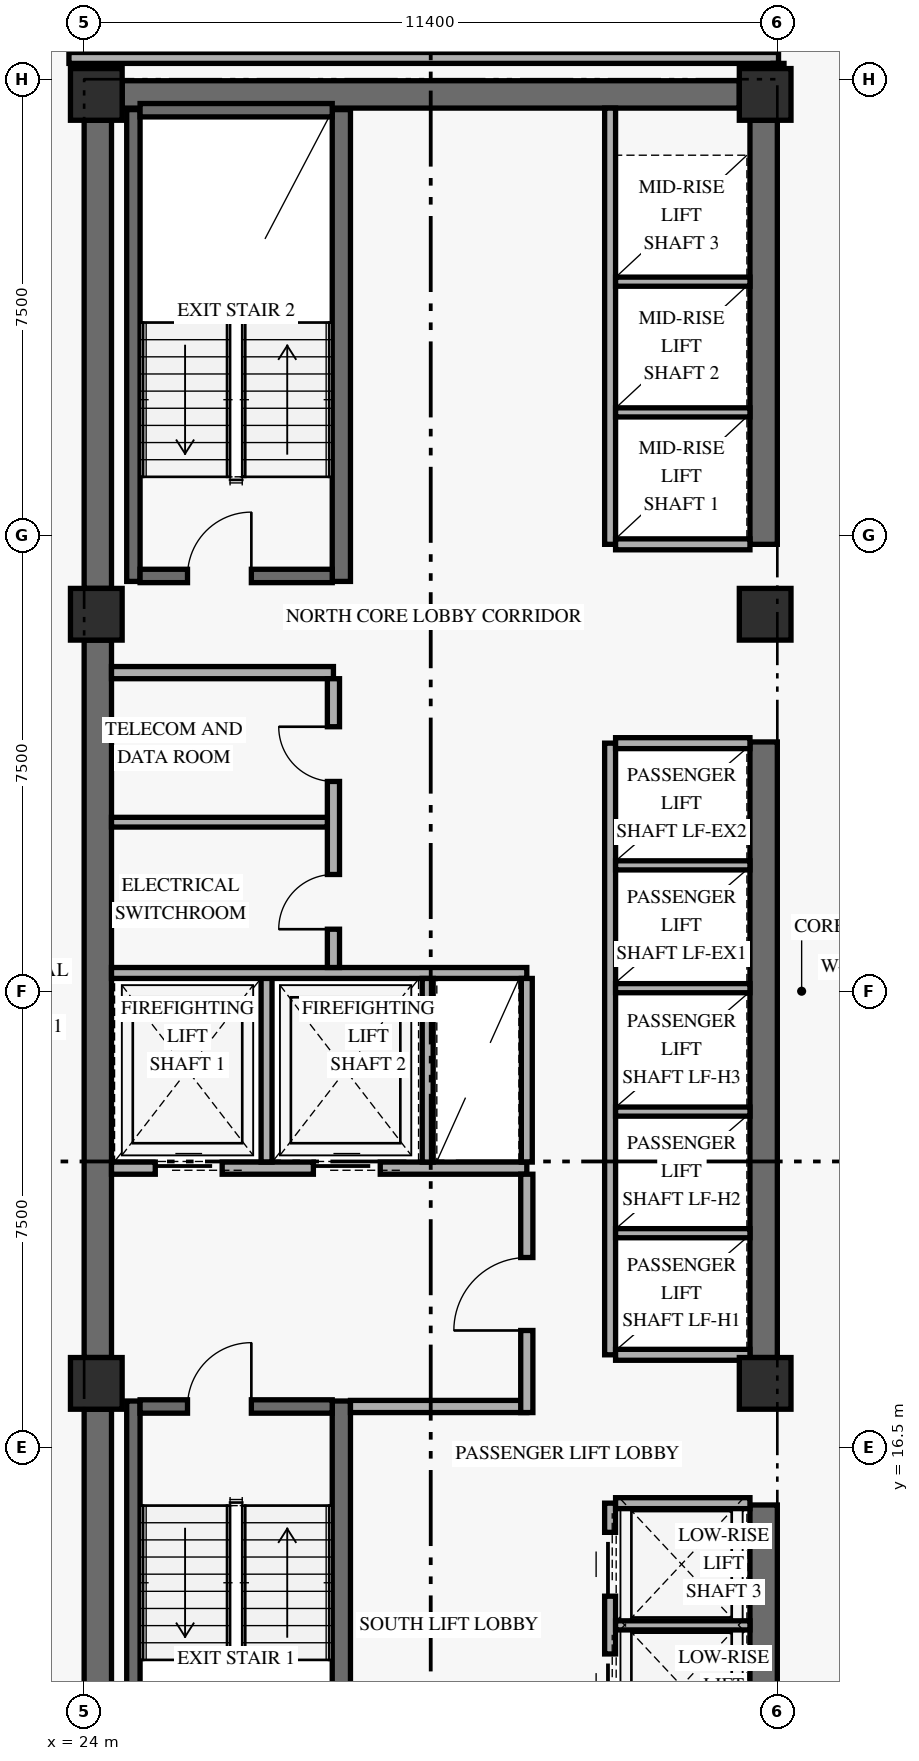
"""IFC4 building model, lengths in metres.
Left out: names, types, materials, properties, quantities, classifications, styles, units other than length and angle.
Written with IfcOpenShell. Run it as: python <this file> out.ifc"""

import sys

from ifc_helpers import new_model, si_unit, direction, frame, frame_2d, origin, origin_2d, place, context, subcontext, project, spatial, rectangle, extrude, element, fill, save


model = new_model("IFC4")
c1 = context("Model", 3, precision=1e-05, world=origin(), true_north=direction((0.0, 1.0)))
c2 = subcontext(c1, "Body", "Model", "MODEL_VIEW")
j1 = project(units=[si_unit("LENGTHUNIT", "METRE"), si_unit("PLANEANGLEUNIT", "RADIAN")], contexts=[c1])
p1 = place(None, origin())
s1 = spatial("IfcSite", under=j1, at=p1, CompositionType="ELEMENT")
p2 = place(p1, origin())
s2 = spatial("IfcBuilding", under=s1, at=p2, CompositionType="ELEMENT")
p3 = place(p2, frame((0.0, 0.0, 49.2)))
s3 = spatial("IfcBuildingStorey", under=s2, at=p3, CompositionType="ELEMENT", Elevation=49.2)
p4 = place(p3, frame((24.225, 9.675, 0.0), z_axis=(0.0, 0.0, 1.0), x_axis=(0.0, 1.0, 0.0)))
e1 = element("IfcWall", 1, at=p4, inside=s3, PredefinedType="SHEAR", context=c2, shape_type="SweptSolid", body=[
    extrude(rectangle(XDim=7.45, YDim=0.45, at=frame_2d((3.725, 0.0))), origin(), (0.0, 0.0, 1.0), 2.667),
])
p5 = place(p3, frame((24.225, 17.975, 0.0), z_axis=(0.0, 0.0, 1.0), x_axis=(0.0, 1.0, 0.0)))
e2 = element("IfcWall", 2, at=p5, inside=s3, PredefinedType="SHEAR", context=c2, shape_type="SweptSolid", body=[
    extrude(rectangle(XDim=11.8, YDim=0.45, at=frame_2d((5.9, 0.0))), origin(), (0.0, 0.0, 1.0), 2.667),
])
p6 = place(p3, frame((24.225, 30.625, 0.0), z_axis=(0.0, 0.0, 1.0), x_axis=(0.0, 1.0, 0.0)))
e3 = element("IfcWall", 3, at=p6, inside=s3, PredefinedType="SHEAR", context=c2, shape_type="SweptSolid", body=[
    extrude(rectangle(XDim=7.7, YDim=0.45, at=frame_2d((3.85, 0.0))), origin(), (0.0, 0.0, 1.0), 2.667),
])
p7 = place(p3, frame((35.175, 9.675, 0.0), z_axis=(0.0, 0.0, 1.0), x_axis=(0.0, 1.0, 0.0)))
e4 = element("IfcWall", 4, at=p7, inside=s3, PredefinedType="SHEAR", context=c2, shape_type="SweptSolid", body=[
    extrude(rectangle(XDim=5.875, YDim=0.45, at=frame_2d((2.938, 0.0))), origin(), (0.0, 0.0, 1.0), 2.667),
])
p8 = place(p3, frame((35.175, 17.975, 0.0), z_axis=(0.0, 0.0, 1.0), x_axis=(0.0, 1.0, 0.0)))
e5 = element("IfcWall", 5, at=p8, inside=s3, PredefinedType="SHEAR", context=c2, shape_type="SweptSolid", body=[
    extrude(rectangle(XDim=10.125, YDim=0.45, at=frame_2d((5.062, 0.0))), origin(), (0.0, 0.0, 1.0), 2.667),
])
p9 = place(p3, frame((35.175, 31.35, 0.0), z_axis=(0.0, 0.0, 1.0), x_axis=(0.0, 1.0, 0.0)))
e6 = element("IfcWall", 6, at=p9, inside=s3, PredefinedType="SHEAR", context=c2, shape_type="SweptSolid", body=[
    extrude(rectangle(XDim=6.975, YDim=0.45, at=frame_2d((3.487, 0.0))), origin(), (0.0, 0.0, 1.0), 2.667),
])
p10 = place(p3, frame((24.625, 38.75, 0.0), z_axis=(0.0, 0.0, 1.0), x_axis=(1.0, 0.0, 0.0)))
e7 = element("IfcWall", 7, at=p10, inside=s3, PredefinedType="SHEAR", context=c2, shape_type="SweptSolid", body=[
    extrude(rectangle(XDim=10.15, YDim=0.45, at=frame_2d((5.075, 0.0))), origin(), (0.0, 0.0, 1.0), 3.36),
])
p11 = place(p3, frame((24.81, 9.5, 0.0), z_axis=(0.0, 0.0, 1.0), x_axis=(0.0, 1.0, 0.0)))
e8 = element("IfcWall", 8, at=p11, inside=s3, PredefinedType="SHEAR", context=c2, shape_type="SweptSolid", body=[
    extrude(rectangle(XDim=7.76, YDim=0.22, at=frame_2d((3.88, 0.0))), origin(), (0.0, 0.0, 1.0), 3.36),
])
p12 = place(p3, frame((28.23, 9.5, 0.0), z_axis=(0.0, 0.0, 1.0), x_axis=(0.0, 1.0, 0.0)))
e9 = element("IfcWall", 9, at=p12, inside=s3, PredefinedType="SHEAR", context=c2, shape_type="SweptSolid", body=[
    extrude(rectangle(XDim=7.76, YDim=0.3, at=frame_2d((3.88, 0.0))), origin(), (0.0, 0.0, 1.0), 3.36),
])
p13 = place(p3, frame((24.92, 17.17, 0.0), z_axis=(0.0, 0.0, 1.0), x_axis=(1.0, 0.0, 0.0)))
e10 = element("IfcWall", 10, at=p13, inside=s3, PredefinedType="SHEAR", context=c2, shape_type="SweptSolid", body=[
    extrude(rectangle(XDim=3.16, YDim=0.22, at=frame_2d((1.58, 0.0))), origin(), (0.0, 0.0, 1.0), 3.36),
])
p14 = place(p13, frame((0.78, 0.0, 0.0)))
e11 = element("IfcOpeningElement", 11, at=p14, cuts=e10, PredefinedType="OPENING", context=c2, shape_type="SweptSolid", body=[
    extrude(rectangle(XDim=1.05, YDim=2.15, at=frame_2d((0.525, 1.075))), frame((0.0, 0.12, 0.0), z_axis=(0.0, -1.0, 0.0), x_axis=(1.0, 0.0, 0.0)), (0.0, 0.0, 1.0), 0.24),
])
p15 = place(p3, frame((24.81, 30.74, 0.0), z_axis=(0.0, 0.0, 1.0), x_axis=(0.0, 1.0, 0.0)))
e12 = element("IfcWall", 12, at=p15, inside=s3, PredefinedType="SHEAR", context=c2, shape_type="SweptSolid", body=[
    extrude(rectangle(XDim=7.76, YDim=0.22, at=frame_2d((3.88, 0.0))), origin(), (0.0, 0.0, 1.0), 3.36),
])
p16 = place(p3, frame((28.23, 30.74, 0.0), z_axis=(0.0, 0.0, 1.0), x_axis=(0.0, 1.0, 0.0)))
e13 = element("IfcWall", 13, at=p16, inside=s3, PredefinedType="SHEAR", context=c2, shape_type="SweptSolid", body=[
    extrude(rectangle(XDim=7.76, YDim=0.3, at=frame_2d((3.88, 0.0))), origin(), (0.0, 0.0, 1.0), 3.36),
])
p17 = place(p3, frame((24.92, 30.83, 0.0), z_axis=(0.0, 0.0, 1.0), x_axis=(1.0, 0.0, 0.0)))
e14 = element("IfcWall", 14, at=p17, inside=s3, PredefinedType="SHEAR", context=c2, shape_type="SweptSolid", body=[
    extrude(rectangle(XDim=3.16, YDim=0.22, at=frame_2d((1.58, 0.0))), origin(), (0.0, 0.0, 1.0), 3.36),
])
p18 = place(p17, frame((0.78, 0.0, 0.0)))
e15 = element("IfcOpeningElement", 15, at=p18, cuts=e14, PredefinedType="OPENING", context=c2, shape_type="SweptSolid", body=[
    extrude(rectangle(XDim=1.05, YDim=2.15, at=frame_2d((0.525, 1.075))), frame((0.0, 0.12, 0.0), z_axis=(0.0, -1.0, 0.0), x_axis=(1.0, 0.0, 0.0)), (0.0, 0.0, 1.0), 0.24),
])
p19 = place(p3, frame((24.92, 38.49, 0.0), z_axis=(0.0, 0.0, 1.0), x_axis=(1.0, 0.0, 0.0)))
e16 = element("IfcWall", 16, at=p19, inside=s3, PredefinedType="SHEAR", context=c2, shape_type="SweptSolid", body=[
    extrude(rectangle(XDim=3.16, YDim=0.22, at=frame_2d((1.58, 0.0))), origin(), (0.0, 0.0, 1.0), 3.36),
])
for number, where, z_axis, x_axis in (
    (17, (24.2, 17.55, 0.0), (0.0, 0.0, 1.0), (1.0, 0.0, 0.0)),
    (18, (24.2, 30.2, 0.0), (0.0, 0.0, 1.0), (1.0, 0.0, 0.0)),
    (19, (24.2, 38.75, 0.0), (0.0, 0.0, 1.0), (1.0, 0.0, 0.0)),
    (20, (35.2, 17.55, 0.0), (0.0, 0.0, 1.0), (1.0, 0.0, 0.0)),
    (21, (35.2, 30.2, 0.0), (0.0, 0.0, 1.0), (1.0, 0.0, 0.0)),
    (22, (35.2, 38.75, 0.0), (0.0, 0.0, 1.0), (1.0, 0.0, 0.0)),
):
    element("IfcColumn", number, at=place(p3, frame(where, z_axis=z_axis, x_axis=x_axis)), inside=s3, PredefinedType="COLUMN", context=c2, shape_type="SweptSolid", body=[
        extrude(rectangle(XDim=0.85, YDim=0.85, at=origin_2d()), origin(), (0.0, 0.0, 1.0), 3.6),
    ])
p20 = place(p3, frame((24.45, 21.09, 0.0), z_axis=(0.0, 0.0, 1.0), x_axis=(1.0, 0.0, 0.0)))
e23 = element("IfcWall", 23, at=p20, inside=s3, PredefinedType="STANDARD", context=c2, shape_type="SweptSolid", body=[
    extrude(rectangle(XDim=6.83, YDim=0.2, at=frame_2d((3.415, 0.0))), origin(), (0.0, 0.0, 1.0), 3.36),
])
p21 = place(p20, frame((0.72, 0.0, 0.0)))
e24 = element("IfcOpeningElement", 24, at=p21, cuts=e23, PredefinedType="OPENING", context=c2, shape_type="SweptSolid", body=[
    extrude(rectangle(XDim=1.1, YDim=2.2, at=frame_2d((0.55, 1.1))), frame((0.0, 0.11, 0.0), z_axis=(0.0, -1.0, 0.0), x_axis=(1.0, 0.0, 0.0)), (0.0, 0.0, 1.0), 0.22),
])
p22 = place(p20, frame((3.32, 0.0, 0.0)))
e25 = element("IfcOpeningElement", 25, at=p22, cuts=e23, PredefinedType="OPENING", context=c2, shape_type="SweptSolid", body=[
    extrude(rectangle(XDim=1.1, YDim=2.2, at=frame_2d((0.55, 1.1))), frame((0.0, 0.11, 0.0), z_axis=(0.0, -1.0, 0.0), x_axis=(1.0, 0.0, 0.0)), (0.0, 0.0, 1.0), 0.22),
])
p23 = place(p3, frame((28.38, 17.17, 0.0), z_axis=(0.0, 0.0, 1.0), x_axis=(1.0, 0.0, 0.0)))
e26 = element("IfcWall", 26, at=p23, inside=s3, PredefinedType="STANDARD", context=c2, shape_type="SweptSolid", body=[
    extrude(rectangle(XDim=2.9, YDim=0.2, at=frame_2d((1.45, 0.0))), origin(), (0.0, 0.0, 1.0), 3.36),
])
p24 = place(p3, frame((31.28, 17.07, 0.0), z_axis=(0.0, 0.0, 1.0), x_axis=(0.0, 1.0, 0.0)))
e27 = element("IfcWall", 27, at=p24, inside=s3, PredefinedType="STANDARD", context=c2, shape_type="SweptSolid", body=[
    extrude(rectangle(XDim=3.92, YDim=0.2, at=frame_2d((1.96, 0.0))), origin(), (0.0, 0.0, 1.0), 2.649),
])
p25 = place(p24, frame((1.35, 0.0, 0.0)))
e28 = element("IfcOpeningElement", 28, at=p25, cuts=e27, PredefinedType="OPENING", context=c2, shape_type="SweptSolid", body=[
    extrude(rectangle(XDim=1.2, YDim=2.15, at=frame_2d((0.6, 1.075))), frame((0.0, 0.11, 0.0), z_axis=(0.0, -1.0, 0.0), x_axis=(1.0, 0.0, 0.0)), (0.0, 0.0, 1.0), 0.22),
])
p26 = place(p3, frame((27.0, 21.19, 0.0), z_axis=(0.0, 0.0, 1.0), x_axis=(0.0, 1.0, 0.0)))
e29 = element("IfcWall", 29, at=p26, inside=s3, PredefinedType="STANDARD", context=c2, shape_type="SweptSolid", body=[
    extrude(rectangle(XDim=3.11, YDim=0.18, at=frame_2d((1.555, 0.0))), origin(), (0.0, 0.0, 1.0), 3.36),
])
p27 = place(p3, frame((24.45, 24.3, 0.0), z_axis=(0.0, 0.0, 1.0), x_axis=(1.0, 0.0, 0.0)))
e30 = element("IfcWall", 30, at=p27, inside=s3, PredefinedType="STANDARD", context=c2, shape_type="SweptSolid", body=[
    extrude(rectangle(XDim=6.83, YDim=0.18, at=frame_2d((3.415, 0.0))), origin(), (0.0, 0.0, 1.0), 3.36),
])
for number, where, z_axis, x_axis in (
    (31, (29.65, 21.19, 0.0), (0.0, 0.0, 1.0), (0.0, 1.0, 0.0)),
    (32, (31.28, 21.19, 0.0), (0.0, 0.0, 1.0), (0.0, 1.0, 0.0)),
):
    element("IfcWall", number, at=place(p3, frame(where, z_axis=z_axis, x_axis=x_axis)), inside=s3, PredefinedType="STANDARD", context=c2, shape_type="SweptSolid", body=[
        extrude(rectangle(XDim=3.02, YDim=0.18, at=frame_2d((1.51, 0.0))), origin(), (0.0, 0.0, 1.0), 3.36),
    ])
p28 = place(p3, frame((24.45, 29.24, 0.0), z_axis=(0.0, 0.0, 1.0), x_axis=(1.0, 0.0, 0.0)))
e33 = element("IfcWall", 33, at=p28, inside=s3, PredefinedType="STANDARD", context=c2, shape_type="SweptSolid", body=[
    extrude(rectangle(XDim=3.65, YDim=0.2, at=frame_2d((1.825, 0.0))), origin(), (0.0, 0.0, 1.0), 3.36),
])
p29 = place(p3, frame((28.1, 24.39, 0.0), z_axis=(0.0, 0.0, 1.0), x_axis=(0.0, 1.0, 0.0)))
e34 = element("IfcWall", 34, at=p29, inside=s3, PredefinedType="STANDARD", context=c2, shape_type="SweptSolid", body=[
    extrude(rectangle(XDim=4.75, YDim=0.2, at=frame_2d((2.375, 0.0))), origin(), (0.0, 0.0, 1.0), 3.36),
])
p30 = place(p29, frame((0.63, 0.0, 0.0)))
e35 = element("IfcOpeningElement", 35, at=p30, cuts=e34, PredefinedType="OPENING", context=c2, shape_type="SweptSolid", body=[
    extrude(rectangle(XDim=0.9, YDim=2.1, at=frame_2d((0.45, 1.05))), frame((0.0, 0.11, 0.0), z_axis=(0.0, -1.0, 0.0), x_axis=(1.0, 0.0, 0.0)), (0.0, 0.0, 1.0), 0.22),
])
p31 = place(p29, frame((3.06, 0.0, 0.0)))
e36 = element("IfcOpeningElement", 36, at=p31, cuts=e34, PredefinedType="OPENING", context=c2, shape_type="SweptSolid", body=[
    extrude(rectangle(XDim=0.9, YDim=2.1, at=frame_2d((0.45, 1.05))), frame((0.0, 0.11, 0.0), z_axis=(0.0, -1.0, 0.0), x_axis=(1.0, 0.0, 0.0)), (0.0, 0.0, 1.0), 0.22),
])
p32 = place(p3, frame((24.45, 26.78, 0.0), z_axis=(0.0, 0.0, 1.0), x_axis=(1.0, 0.0, 0.0)))
e37 = element("IfcWall", 37, at=p32, inside=s3, PredefinedType="PARTITIONING", context=c2, shape_type="SweptSolid", body=[
    extrude(rectangle(XDim=3.55, YDim=0.16, at=frame_2d((1.775, 0.0))), origin(), (0.0, 0.0, 1.0), 3.36),
])
p33 = place(p3, frame((32.65, 9.5, 0.0), z_axis=(0.0, 0.0, 1.0), x_axis=(0.0, 1.0, 0.0)))
e38 = element("IfcWall", 38, at=p33, inside=s3, PredefinedType="STANDARD", context=c2, shape_type="SweptSolid", body=[
    extrude(rectangle(XDim=6.08, YDim=0.18, at=frame_2d((3.04, 0.0))), origin(), (0.0, 0.0, 1.0), 3.36),
])
p34 = place(p33, frame((0.55, 0.0, 0.0)))
e39 = element("IfcOpeningElement", 39, at=p34, cuts=e38, PredefinedType="OPENING", context=c2, shape_type="SweptSolid", body=[
    extrude(rectangle(XDim=1.05, YDim=2.2, at=frame_2d((0.525, 1.1))), frame((0.0, 0.1, 0.0), z_axis=(0.0, -1.0, 0.0), x_axis=(1.0, 0.0, 0.0)), (0.0, 0.0, 1.0), 0.2),
])
p35 = place(p33, frame((2.55, 0.0, 0.0)))
e40 = element("IfcOpeningElement", 40, at=p35, cuts=e38, PredefinedType="OPENING", context=c2, shape_type="SweptSolid", body=[
    extrude(rectangle(XDim=1.05, YDim=2.2, at=frame_2d((0.525, 1.1))), frame((0.0, 0.1, 0.0), z_axis=(0.0, -1.0, 0.0), x_axis=(1.0, 0.0, 0.0)), (0.0, 0.0, 1.0), 0.2),
])
p36 = place(p33, frame((4.55, 0.0, 0.0)))
e41 = element("IfcOpeningElement", 41, at=p36, cuts=e38, PredefinedType="OPENING", context=c2, shape_type="SweptSolid", body=[
    extrude(rectangle(XDim=1.05, YDim=2.2, at=frame_2d((0.525, 1.1))), frame((0.0, 0.1, 0.0), z_axis=(0.0, -1.0, 0.0), x_axis=(1.0, 0.0, 0.0)), (0.0, 0.0, 1.0), 0.2),
])
p37 = place(p3, frame((32.74, 15.58, 0.0), z_axis=(0.0, 0.0, 1.0), x_axis=(1.0, 0.0, 0.0)))
e42 = element("IfcWall", 42, at=p37, inside=s3, PredefinedType="STANDARD", context=c2, shape_type="SweptSolid", body=[
    extrude(rectangle(XDim=2.21, YDim=0.18, at=frame_2d((1.105, 0.0))), origin(), (0.0, 0.0, 1.0), 3.36),
])
p38 = place(p3, frame((32.74, 13.57, 0.0), z_axis=(0.0, 0.0, 1.0), x_axis=(1.0, 0.0, 0.0)))
e43 = element("IfcWall", 43, at=p38, inside=s3, PredefinedType="STANDARD", context=c2, shape_type="SweptSolid", body=[
    extrude(rectangle(XDim=2.21, YDim=0.15, at=frame_2d((1.105, 0.0))), origin(), (0.0, 0.0, 1.0), 3.36),
])
p39 = place(p3, frame((32.65, 18.02, 0.0), z_axis=(0.0, 0.0, 1.0), x_axis=(0.0, 1.0, 0.0)))
e44 = element("IfcWall", 44, at=p39, inside=s3, PredefinedType="STANDARD", context=c2, shape_type="SweptSolid", body=[
    extrude(rectangle(XDim=10.06, YDim=0.18, at=frame_2d((5.03, 0.0))), origin(), (0.0, 0.0, 1.0), 3.36),
])
for number, where, z_axis, x_axis in (
    (45, (32.74, 18.02, 0.0), (0.0, 0.0, 1.0), (1.0, 0.0, 0.0)),
    (46, (32.74, 28.08, 0.0), (0.0, 0.0, 1.0), (1.0, 0.0, 0.0)),
):
    element("IfcWall", number, at=place(p3, frame(where, z_axis=z_axis, x_axis=x_axis)), inside=s3, PredefinedType="STANDARD", context=c2, shape_type="SweptSolid", body=[
        extrude(rectangle(XDim=2.21, YDim=0.18, at=frame_2d((1.105, 0.0))), origin(), (0.0, 0.0, 1.0), 3.36),
    ])
for number, where, z_axis, x_axis in (
    (47, (32.74, 20.02, 0.0), (0.0, 0.0, 1.0), (1.0, 0.0, 0.0)),
    (48, (32.74, 22.02, 0.0), (0.0, 0.0, 1.0), (1.0, 0.0, 0.0)),
    (49, (32.74, 24.05, 0.0), (0.0, 0.0, 1.0), (1.0, 0.0, 0.0)),
    (50, (32.74, 26.07, 0.0), (0.0, 0.0, 1.0), (1.0, 0.0, 0.0)),
):
    element("IfcWall", number, at=place(p3, frame(where, z_axis=z_axis, x_axis=x_axis)), inside=s3, PredefinedType="STANDARD", context=c2, shape_type="SweptSolid", body=[
        extrude(rectangle(XDim=2.21, YDim=0.15, at=frame_2d((1.105, 0.0))), origin(), (0.0, 0.0, 1.0), 3.36),
    ])
p40 = place(p3, frame((32.65, 31.35, 0.0), z_axis=(0.0, 0.0, 1.0), x_axis=(0.0, 1.0, 0.0)))
e51 = element("IfcWall", 51, at=p40, inside=s3, PredefinedType="STANDARD", context=c2, shape_type="SweptSolid", body=[
    extrude(rectangle(XDim=7.175, YDim=0.18, at=frame_2d((3.587, 0.0))), origin(), (0.0, 0.0, 1.0), 3.36),
])
p41 = place(p3, frame((32.74, 31.35, 0.0), z_axis=(0.0, 0.0, 1.0), x_axis=(1.0, 0.0, 0.0)))
e52 = element("IfcWall", 52, at=p41, inside=s3, PredefinedType="STANDARD", context=c2, shape_type="SweptSolid", body=[
    extrude(rectangle(XDim=2.21, YDim=0.18, at=frame_2d((1.105, 0.0))), origin(), (0.0, 0.0, 1.0), 3.36),
])
for number, where, z_axis, x_axis in (
    (53, (32.74, 33.52, 0.0), (0.0, 0.0, 1.0), (1.0, 0.0, 0.0)),
    (54, (32.74, 35.67, 0.0), (0.0, 0.0, 1.0), (1.0, 0.0, 0.0)),
):
    element("IfcWall", number, at=place(p3, frame(where, z_axis=z_axis, x_axis=x_axis)), inside=s3, PredefinedType="STANDARD", context=c2, shape_type="SweptSolid", body=[
        extrude(rectangle(XDim=2.21, YDim=0.15, at=frame_2d((1.105, 0.0))), origin(), (0.0, 0.0, 1.0), 3.36),
    ])
p42 = place(p3, frame((23.75, 39.35, 0.0), z_axis=(0.0, 0.0, 1.0), x_axis=(1.0, 0.0, 0.0)))
e55 = element("IfcWall", 55, at=p42, inside=s3, PredefinedType="STANDARD", context=c2, shape_type="SweptSolid", body=[
    extrude(rectangle(XDim=11.67, YDim=0.18, at=frame_2d((5.835, 0.0))), origin(), (0.0, 0.0, 1.0), 2.649),
])
p43 = place(p3, frame((35.42, 38.75, 0.0), z_axis=(0.0, 0.0, 1.0), x_axis=(0.0, 1.0, 0.0)))
e56 = element("IfcWall", 56, at=p43, inside=s3, PredefinedType="STANDARD", context=c2, shape_type="SweptSolid", body=[
    extrude(rectangle(XDim=0.51, YDim=0.18, at=frame_2d((0.255, 0.0))), origin(), (0.0, 0.0, 1.0), 3.36),
])
p44 = place(p14, frame((1.05, 0.0, 0.0), z_axis=(0.0, 0.0, 1.0), x_axis=(-1.0, 0.0, 0.0)))
e57 = element("IfcDoor", 57, at=p44, inside=s3, OperationType="SINGLE_SWING_LEFT", PredefinedType="DOOR", context=c2, shape_type="SweptSolid", body=[
    extrude(rectangle(XDim=1.05, YDim=2.15, at=frame_2d((0.525, 1.075))), frame((0.0, 0.025, 0.0), z_axis=(0.0, -1.0, 0.0), x_axis=(1.0, 0.0, 0.0)), (0.0, 0.0, 1.0), 0.05),
])
fill(e11, e57)
p45 = place(p18, origin())
e58 = element("IfcDoor", 58, at=p45, inside=s3, OperationType="SINGLE_SWING_RIGHT", PredefinedType="DOOR", context=c2, shape_type="SweptSolid", body=[
    extrude(rectangle(XDim=1.05, YDim=2.15, at=frame_2d((0.525, 1.075))), frame((0.0, 0.025, 0.0), z_axis=(0.0, -1.0, 0.0), x_axis=(1.0, 0.0, 0.0)), (0.0, 0.0, 1.0), 0.05),
])
fill(e15, e58)
p46 = place(p21, origin())
e59 = element("IfcDoor", 59, at=p46, inside=s3, OperationType="SLIDING_TO_LEFT", PredefinedType="DOOR", context=c2, shape_type="SweptSolid", body=[
    extrude(rectangle(XDim=1.1, YDim=2.2, at=frame_2d((0.55, 1.1))), frame((0.0, 0.025, 0.0), z_axis=(0.0, -1.0, 0.0), x_axis=(1.0, 0.0, 0.0)), (0.0, 0.0, 1.0), 0.05),
])
fill(e24, e59)
p47 = place(p22, origin())
e60 = element("IfcDoor", 60, at=p47, inside=s3, OperationType="SLIDING_TO_LEFT", PredefinedType="DOOR", context=c2, shape_type="SweptSolid", body=[
    extrude(rectangle(XDim=1.1, YDim=2.2, at=frame_2d((0.55, 1.1))), frame((0.0, 0.025, 0.0), z_axis=(0.0, -1.0, 0.0), x_axis=(1.0, 0.0, 0.0)), (0.0, 0.0, 1.0), 0.05),
])
fill(e25, e60)
p48 = place(p25, origin())
e61 = element("IfcDoor", 61, at=p48, inside=s3, OperationType="SINGLE_SWING_LEFT", PredefinedType="DOOR", context=c2, shape_type="SweptSolid", body=[
    extrude(rectangle(XDim=1.2, YDim=2.15, at=frame_2d((0.6, 1.075))), frame((0.0, 0.025, 0.0), z_axis=(0.0, -1.0, 0.0), x_axis=(1.0, 0.0, 0.0)), (0.0, 0.0, 1.0), 0.05),
])
fill(e28, e61)
p49 = place(p30, origin())
e62 = element("IfcDoor", 62, at=p49, inside=s3, OperationType="SINGLE_SWING_LEFT", PredefinedType="DOOR", context=c2, shape_type="SweptSolid", body=[
    extrude(rectangle(XDim=0.9, YDim=2.1, at=frame_2d((0.45, 1.05))), frame((0.0, 0.025, 0.0), z_axis=(0.0, -1.0, 0.0), x_axis=(1.0, 0.0, 0.0)), (0.0, 0.0, 1.0), 0.05),
])
fill(e35, e62)
p50 = place(p31, origin())
e63 = element("IfcDoor", 63, at=p50, inside=s3, OperationType="SINGLE_SWING_RIGHT", PredefinedType="DOOR", context=c2, shape_type="SweptSolid", body=[
    extrude(rectangle(XDim=0.9, YDim=2.1, at=frame_2d((0.45, 1.05))), frame((0.0, 0.025, 0.0), z_axis=(0.0, -1.0, 0.0), x_axis=(1.0, 0.0, 0.0)), (0.0, 0.0, 1.0), 0.05),
])
fill(e36, e63)
p51 = place(p35, origin())
e64 = element("IfcDoor", 64, at=p51, inside=s3, OperationType="SLIDING_TO_LEFT", PredefinedType="DOOR", context=c2, shape_type="SweptSolid", body=[
    extrude(rectangle(XDim=1.05, YDim=2.2, at=frame_2d((0.525, 1.1))), frame((0.0, 0.025, 0.0), z_axis=(0.0, -1.0, 0.0), x_axis=(1.0, 0.0, 0.0)), (0.0, 0.0, 1.0), 0.05),
])
fill(e40, e64)
p52 = place(p36, origin())
e65 = element("IfcDoor", 65, at=p52, inside=s3, OperationType="SLIDING_TO_LEFT", PredefinedType="DOOR", context=c2, shape_type="SweptSolid", body=[
    extrude(rectangle(XDim=1.05, YDim=2.2, at=frame_2d((0.525, 1.1))), frame((0.0, 0.025, 0.0), z_axis=(0.0, -1.0, 0.0), x_axis=(1.0, 0.0, 0.0)), (0.0, 0.0, 1.0), 0.05),
])
fill(e41, e65)
save(model, sys.argv[1])
